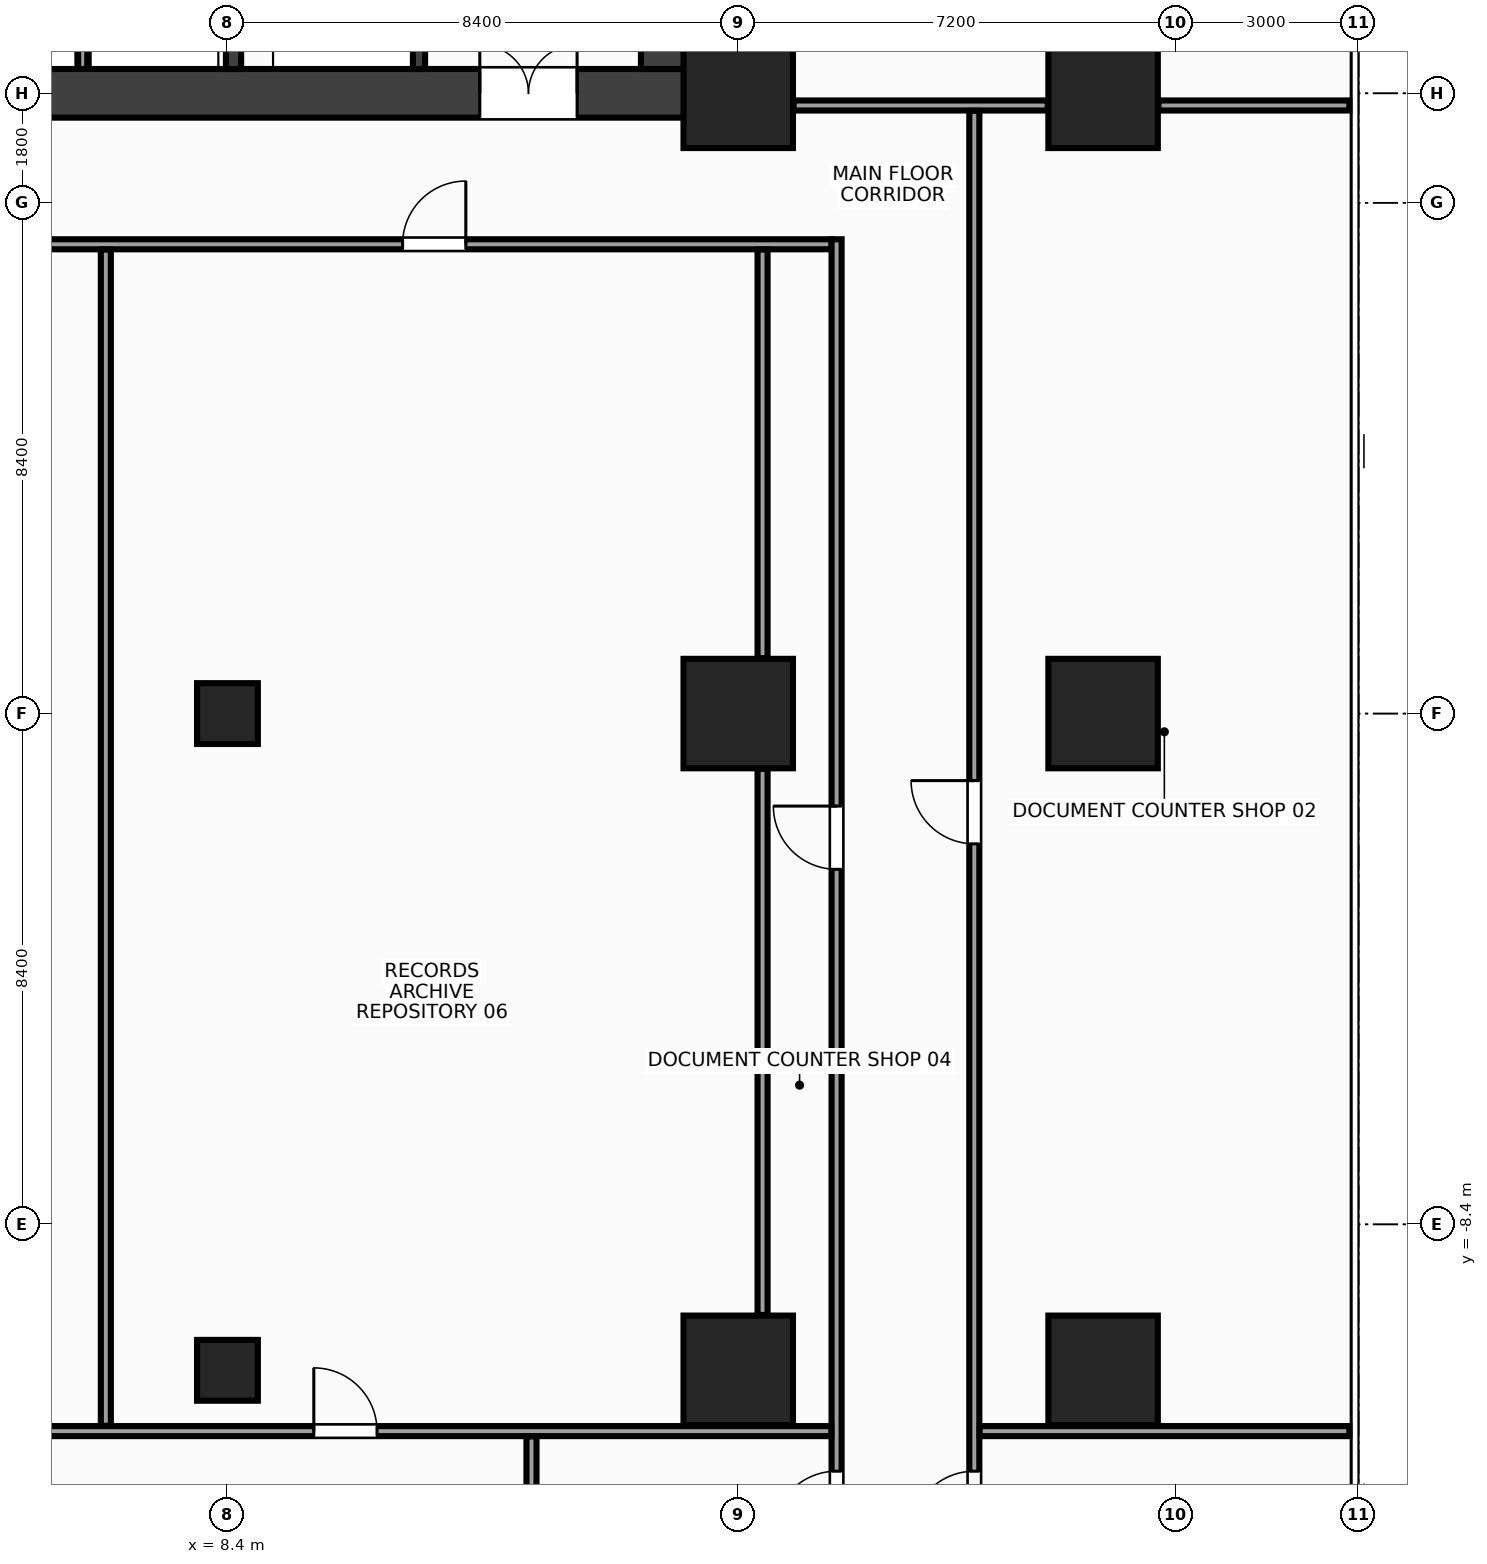
"""IFC4 building model, lengths in metres.
Left out: names, types, materials, properties, quantities, classifications, styles, units other than length and angle.
Written with IfcOpenShell. Run it as: python <this file> out.ifc"""

import sys

from ifc_helpers import new_model, si_unit, direction, frame, frame_2d, origin, origin_2d, place, context, subcontext, project, spatial, rectangle, hollow_rectangle, extrude, source, transform, mapped, element, fill, save


model = new_model("IFC4")
c1 = context("Model", 3, precision=1e-05, world=origin(), true_north=direction((0.0, 1.0)))
c2 = subcontext(c1, "Body", "Model", "MODEL_VIEW")
j1 = project(units=[si_unit("LENGTHUNIT", "METRE"), si_unit("PLANEANGLEUNIT", "RADIAN")], contexts=[c1])
p1 = place(None, origin())
s1 = spatial("IfcSite", under=j1, at=p1, CompositionType="ELEMENT")
p2 = place(p1, origin())
s2 = spatial("IfcBuilding", under=s1, at=p2, CompositionType="ELEMENT")
p3 = place(p2, frame((0.0, 0.0, 59.6)))
s3 = spatial("IfcBuildingStorey", under=s2, at=p3, CompositionType="ELEMENT", Elevation=59.6)
m1 = source(origin(), c2, "Body", "SweptSolid", [
    extrude(rectangle(XDim=32.0, YDim=0.8, at=frame_2d((16.0, 0.0))), origin(), (0.0, 0.0, 1.0), 3.6),
])
p4 = place(p3, frame((-16.0, 10.2, 0.0), z_axis=(0.0, 0.0, 1.0), x_axis=(1.0, 0.0, 0.0)))
e1 = element("IfcWall", 1, at=p4, inside=s3, PredefinedType="SHEAR", context=c2, shape_type="MappedRepresentation", body=[
    mapped(m1, transform((0.0, 0.0, 0.0), x_axis=(1.0, 0.0, 0.0), y_axis=(0.0, 1.0, 0.0), z_axis=(0.0, 0.0, 1.0), scale=1.0)),
])
p5 = place(p4, frame((1.85, 0.0, 0.0)))
e2 = element("IfcOpeningElement", 2, at=p5, cuts=e1, PredefinedType="OPENING", context=c2, shape_type="SweptSolid", body=[
    extrude(rectangle(XDim=1.6, YDim=2.15, at=frame_2d((0.8, 1.075))), frame((0.0, 0.412, 0.0), z_axis=(0.0, -1.0, 0.0), x_axis=(1.0, 0.0, 0.0)), (0.0, 0.0, 1.0), 0.824),
])
p6 = place(p4, frame((28.55, 0.0, 0.0)))
e3 = element("IfcOpeningElement", 3, at=p6, cuts=e1, PredefinedType="OPENING", context=c2, shape_type="SweptSolid", body=[
    extrude(rectangle(XDim=1.6, YDim=2.15, at=frame_2d((0.8, 1.075))), frame((0.0, 0.412, 0.0), z_axis=(0.0, -1.0, 0.0), x_axis=(1.0, 0.0, 0.0)), (0.0, 0.0, 1.0), 0.824),
])
p7 = place(p4, frame((15.25, 0.0, 0.0)))
e4 = element("IfcOpeningElement", 4, at=p7, cuts=e1, PredefinedType="OPENING", context=c2, shape_type="SweptSolid", body=[
    extrude(rectangle(XDim=1.5, YDim=2.2, at=frame_2d((0.75, 1.1))), frame((0.0, 0.412, 0.0), z_axis=(0.0, -1.0, 0.0), x_axis=(1.0, 0.0, 0.0)), (0.0, 0.0, 1.0), 0.824),
])
m2 = source(origin(), c2, "Body", "SweptSolid", [
    extrude(rectangle(XDim=12.8, YDim=0.8, at=frame_2d((6.4, 0.0))), origin(), (0.0, 0.0, 1.0), 3.6),
])
p8 = place(p3, frame((15.6, 10.6, 0.0), z_axis=(0.0, 0.0, 1.0), x_axis=(0.0, 1.0, 0.0)))
e5 = element("IfcWall", 5, at=p8, inside=s3, PredefinedType="SHEAR", context=c2, shape_type="MappedRepresentation", body=[
    mapped(m2, transform((0.0, 0.0, 0.0), x_axis=(1.0, 0.0, 0.0), y_axis=(0.0, 1.0, 0.0), z_axis=(0.0, 0.0, 1.0), scale=1.0)),
])
m3 = source(origin(), c2, "Body", "SweptSolid", [
    extrude(rectangle(XDim=12.8, YDim=0.25, at=frame_2d((6.4, 0.0))), origin(), (0.0, 0.0, 1.0), 3.6),
])
p9 = place(p3, frame((8.5, 10.6, 0.0), z_axis=(0.0, 0.0, 1.0), x_axis=(0.0, 1.0, 0.0)))
e6 = element("IfcWall", 6, at=p9, inside=s3, PredefinedType="SHEAR", context=c2, shape_type="MappedRepresentation", body=[
    mapped(m3, transform((0.0, 0.0, 0.0), x_axis=(1.0, 0.0, 0.0), y_axis=(0.0, 1.0, 0.0), z_axis=(0.0, 0.0, 1.0), scale=1.0)),
])
p10 = place(p9, frame((9.85, 0.0, 0.0)))
e7 = element("IfcOpeningElement", 7, at=p10, cuts=e6, PredefinedType="OPENING", context=c2, shape_type="SweptSolid", body=[
    extrude(rectangle(XDim=0.95, YDim=2.15, at=frame_2d((0.475, 1.075))), frame((0.0, 0.137, 0.0), z_axis=(0.0, -1.0, 0.0), x_axis=(1.0, 0.0, 0.0)), (0.0, 0.0, 1.0), 0.274),
])
m4 = source(origin(), c2, "Body", "SweptSolid", [
    extrude(rectangle(XDim=3.05, YDim=0.2, at=frame_2d((1.525, 0.0))), origin(), (0.0, 0.0, 1.0), 3.6),
])
p11 = place(p3, frame((11.55, 10.6, 0.0), z_axis=(0.0, 0.0, 1.0), x_axis=(0.0, 1.0, 0.0)))
e8 = element("IfcWall", 8, at=p11, inside=s3, PredefinedType="SHEAR", context=c2, shape_type="MappedRepresentation", body=[
    mapped(m4, transform((0.0, 0.0, 0.0), x_axis=(1.0, 0.0, 0.0), y_axis=(0.0, 1.0, 0.0), z_axis=(0.0, 0.0, 1.0), scale=1.0)),
])
p12 = place(p11, frame((0.9, 0.0, 0.0)))
e9 = element("IfcOpeningElement", 9, at=p12, cuts=e8, PredefinedType="OPENING", context=c2, shape_type="SweptSolid", body=[
    extrude(rectangle(XDim=1.1, YDim=2.15, at=frame_2d((0.55, 1.075))), frame((0.0, 0.112, 0.0), z_axis=(0.0, -1.0, 0.0), x_axis=(1.0, 0.0, 0.0)), (0.0, 0.0, 1.0), 0.224),
])
m5 = source(origin(), c2, "Body", "SweptSolid", [
    extrude(rectangle(XDim=1.8, YDim=1.8, at=origin_2d()), origin(), (0.0, 0.0, 1.0), 3.6),
])
for number, where, z_axis, x_axis in (
    (10, (16.8, -10.8, 0.0), (0.0, 0.0, 1.0), (1.0, 0.0, 0.0)),
    (11, (16.8, 0.0, 0.0), (0.0, 0.0, 1.0), (1.0, 0.0, 0.0)),
    (12, (16.8, 10.2, 0.0), (0.0, 0.0, 1.0), (1.0, 0.0, 0.0)),
    (13, (22.8, -10.8, 0.0), (0.0, 0.0, 1.0), (1.0, 0.0, 0.0)),
    (14, (22.8, 0.0, 0.0), (0.0, 0.0, 1.0), (1.0, 0.0, 0.0)),
    (15, (22.8, 10.2, 0.0), (0.0, 0.0, 1.0), (1.0, 0.0, 0.0)),
):
    element("IfcColumn", number, at=place(p3, frame(where, z_axis=z_axis, x_axis=x_axis)), inside=s3, PredefinedType="COLUMN", context=c2, shape_type="MappedRepresentation", body=[
        mapped(m5, transform((0.0, 0.0, 0.0), x_axis=(1.0, 0.0, 0.0), y_axis=(0.0, 1.0, 0.0), z_axis=(0.0, 0.0, 1.0), scale=1.0)),
    ])
m6 = source(origin(), c2, "Body", "SweptSolid", [
    extrude(hollow_rectangle(XDim=1.0, YDim=1.0, WallThickness=0.045, at=origin_2d()), origin(), (0.0, 0.0, 1.0), 3.6),
])
for number, where, z_axis, x_axis in (
    (16, (8.4, 0.0, 0.0), (0.0, 0.0, 1.0), (1.0, 0.0, 0.0)),
    (17, (8.4, -10.8, 0.0), (0.0, 0.0, 1.0), (1.0, 0.0, 0.0)),
):
    element("IfcColumn", number, at=place(p3, frame(where, z_axis=z_axis, x_axis=x_axis)), inside=s3, PredefinedType="COLUMN", context=c2, shape_type="MappedRepresentation", body=[
        mapped(m6, transform((0.0, 0.0, 0.0), x_axis=(1.0, 0.0, 0.0), y_axis=(0.0, 1.0, 0.0), z_axis=(0.0, 0.0, 1.0), scale=1.0)),
    ])
m7 = source(origin(), c2, "Body", "SweptSolid", [
    extrude(rectangle(XDim=3.34, YDim=0.15, at=frame_2d((1.67, 0.0))), origin(), (0.0, 0.0, 1.0), 3.36),
])
p13 = place(p3, frame((6.02, 10.6, 0.0), z_axis=(0.0, 0.0, 1.0), x_axis=(0.0, 1.0, 0.0)))
e18 = element("IfcWall", 18, at=p13, inside=s3, PredefinedType="PARTITIONING", context=c2, shape_type="MappedRepresentation", body=[
    mapped(m7, transform((0.0, 0.0, 0.0), x_axis=(1.0, 0.0, 0.0), y_axis=(0.0, 1.0, 0.0), z_axis=(0.0, 0.0, 1.0), scale=1.0)),
])
m8 = source(origin(), c2, "Body", "SweptSolid", [
    extrude(rectangle(XDim=4.18, YDim=0.165, at=frame_2d((2.09, 0.0))), origin(), (0.0, 0.0, 1.0), 2.745),
])
p14 = place(p3, frame((17.71, 10.0, 0.0), z_axis=(0.0, 0.0, 1.0), x_axis=(1.0, 0.0, 0.0)))
e19 = element("IfcWall", 19, at=p14, inside=s3, PredefinedType="PARTITIONING", context=c2, shape_type="MappedRepresentation", body=[
    mapped(m8, transform((0.0, 0.0, 0.0), x_axis=(1.0, 0.0, 0.0), y_axis=(0.0, 1.0, 0.0), z_axis=(0.0, 0.0, 1.0), scale=1.0)),
])
m9 = source(origin(), c2, "Body", "SweptSolid", [
    extrude(rectangle(XDim=3.14, YDim=0.165, at=frame_2d((1.57, 0.0))), origin(), (0.0, 0.0, 1.0), 2.435),
])
p15 = place(p3, frame((23.71, 10.0, 0.0), z_axis=(0.0, 0.0, 1.0), x_axis=(1.0, 0.0, 0.0)))
e20 = element("IfcWall", 20, at=p15, inside=s3, PredefinedType="PARTITIONING", context=c2, shape_type="MappedRepresentation", body=[
    mapped(m9, transform((0.0, 0.0, 0.0), x_axis=(1.0, 0.0, 0.0), y_axis=(0.0, 1.0, 0.0), z_axis=(0.0, 0.0, 1.0), scale=1.0)),
])
m10 = source(origin(), c2, "Body", "SweptSolid", [
    extrude(rectangle(XDim=36.67, YDim=0.165, at=frame_2d((18.335, 0.0))), origin(), (0.0, 0.0, 1.0), 2.745),
])
p16 = place(p3, frame((-18.335, 7.718, 0.0), z_axis=(0.0, 0.0, 1.0), x_axis=(1.0, 0.0, 0.0)))
e21 = element("IfcWall", 21, at=p16, inside=s3, PredefinedType="PARTITIONING", context=c2, shape_type="MappedRepresentation", body=[
    mapped(m10, transform((0.0, 0.0, 0.0), x_axis=(1.0, 0.0, 0.0), y_axis=(0.0, 1.0, 0.0), z_axis=(0.0, 0.0, 1.0), scale=1.0)),
])
p17 = place(p16, frame((6.015, 0.0, 0.0)))
e22 = element("IfcOpeningElement", 22, at=p17, cuts=e21, PredefinedType="OPENING", context=c2, shape_type="SweptSolid", body=[
    extrude(rectangle(XDim=1.04, YDim=2.2, at=frame_2d((0.52, 1.1))), frame((0.0, 0.094, 0.0), z_axis=(0.0, -1.0, 0.0), x_axis=(1.0, 0.0, 0.0)), (0.0, 0.0, 1.0), 0.189),
])
p18 = place(p16, frame((29.615, 0.0, 0.0)))
e23 = element("IfcOpeningElement", 23, at=p18, cuts=e21, PredefinedType="OPENING", context=c2, shape_type="SweptSolid", body=[
    extrude(rectangle(XDim=1.04, YDim=2.2, at=frame_2d((0.52, 1.1))), frame((0.0, 0.094, 0.0), z_axis=(0.0, -1.0, 0.0), x_axis=(1.0, 0.0, 0.0)), (0.0, 0.0, 1.0), 0.189),
])
p19 = place(p16, frame((17.815, 0.0, 0.0)))
e24 = element("IfcOpeningElement", 24, at=p19, cuts=e21, PredefinedType="OPENING", context=c2, shape_type="SweptSolid", body=[
    extrude(rectangle(XDim=1.04, YDim=2.2, at=frame_2d((0.52, 1.1))), frame((0.0, 0.094, 0.0), z_axis=(0.0, -1.0, 0.0), x_axis=(1.0, 0.0, 0.0)), (0.0, 0.0, 1.0), 0.189),
])
m11 = source(origin(), c2, "Body", "SweptSolid", [
    extrude(rectangle(XDim=21.995, YDim=0.165, at=frame_2d((10.998, 0.0))), origin(), (0.0, 0.0, 1.0), 2.745),
])
p20 = place(p3, frame((18.417, -14.195, 0.0), z_axis=(0.0, 0.0, 1.0), x_axis=(0.0, 1.0, 0.0)))
e25 = element("IfcWall", 25, at=p20, inside=s3, PredefinedType="PARTITIONING", context=c2, shape_type="MappedRepresentation", body=[
    mapped(m11, transform((0.0, 0.0, 0.0), x_axis=(1.0, 0.0, 0.0), y_axis=(0.0, 1.0, 0.0), z_axis=(0.0, 0.0, 1.0), scale=1.0)),
])
p21 = place(p20, frame((11.634, 0.0, 0.0)))
e26 = element("IfcOpeningElement", 26, at=p21, cuts=e25, PredefinedType="OPENING", context=c2, shape_type="SweptSolid", body=[
    extrude(rectangle(XDim=1.04, YDim=2.2, at=frame_2d((0.52, 1.1))), frame((0.0, 0.094, 0.0), z_axis=(0.0, -1.0, 0.0), x_axis=(1.0, 0.0, 0.0)), (0.0, 0.0, 1.0), 0.189),
])
p22 = place(p20, frame((0.696, 0.0, 0.0)))
e27 = element("IfcOpeningElement", 27, at=p22, cuts=e25, PredefinedType="OPENING", context=c2, shape_type="SweptSolid", body=[
    extrude(rectangle(XDim=1.04, YDim=2.2, at=frame_2d((0.52, 1.1))), frame((0.0, 0.094, 0.0), z_axis=(0.0, -1.0, 0.0), x_axis=(1.0, 0.0, 0.0)), (0.0, 0.0, 1.0), 0.189),
])
m12 = source(origin(), c2, "Body", "SweptSolid", [
    extrude(rectangle(XDim=24.108, YDim=0.165, at=frame_2d((12.054, 0.0))), origin(), (0.0, 0.0, 1.0), 2.745),
])
p23 = place(p3, frame((20.683, -14.195, 0.0), z_axis=(0.0, 0.0, 1.0), x_axis=(0.0, 1.0, 0.0)))
e28 = element("IfcWall", 28, at=p23, inside=s3, PredefinedType="PARTITIONING", context=c2, shape_type="MappedRepresentation", body=[
    mapped(m12, transform((0.0, 0.0, 0.0), x_axis=(1.0, 0.0, 0.0), y_axis=(0.0, 1.0, 0.0), z_axis=(0.0, 0.0, 1.0), scale=1.0)),
])
p24 = place(p23, frame((12.052, 0.0, 0.0)))
e29 = element("IfcOpeningElement", 29, at=p24, cuts=e28, PredefinedType="OPENING", context=c2, shape_type="SweptSolid", body=[
    extrude(rectangle(XDim=1.04, YDim=2.2, at=frame_2d((0.52, 1.1))), frame((0.0, 0.094, 0.0), z_axis=(0.0, -1.0, 0.0), x_axis=(1.0, 0.0, 0.0)), (0.0, 0.0, 1.0), 0.189),
])
p25 = place(p23, frame((0.696, 0.0, 0.0)))
e30 = element("IfcOpeningElement", 30, at=p25, cuts=e28, PredefinedType="OPENING", context=c2, shape_type="SweptSolid", body=[
    extrude(rectangle(XDim=1.04, YDim=2.2, at=frame_2d((0.52, 1.1))), frame((0.0, 0.094, 0.0), z_axis=(0.0, -1.0, 0.0), x_axis=(1.0, 0.0, 0.0)), (0.0, 0.0, 1.0), 0.189),
])
m13 = source(origin(), c2, "Body", "SweptSolid", [
    extrude(rectangle(XDim=36.66, YDim=0.165, at=frame_2d((18.33, 0.0))), origin(), (0.0, 0.0, 1.0), 2.945),
])
p26 = place(p3, frame((-18.33, -11.8, 0.0), z_axis=(0.0, 0.0, 1.0), x_axis=(1.0, 0.0, 0.0)))
e31 = element("IfcWall", 31, at=p26, inside=s3, PredefinedType="PARTITIONING", context=c2, shape_type="MappedRepresentation", body=[
    mapped(m13, transform((0.0, 0.0, 0.0), x_axis=(1.0, 0.0, 0.0), y_axis=(0.0, 1.0, 0.0), z_axis=(0.0, 0.0, 1.0), scale=1.0)),
])
p27 = place(p26, frame((7.47, 0.0, 0.0)))
e32 = element("IfcOpeningElement", 32, at=p27, cuts=e31, PredefinedType="OPENING", context=c2, shape_type="SweptSolid", body=[
    extrude(rectangle(XDim=1.04, YDim=2.2, at=frame_2d((0.52, 1.1))), frame((0.0, 0.094, 0.0), z_axis=(0.0, -1.0, 0.0), x_axis=(1.0, 0.0, 0.0)), (0.0, 0.0, 1.0), 0.189),
])
p28 = place(p26, frame((15.83, 0.0, 0.0)))
e33 = element("IfcOpeningElement", 33, at=p28, cuts=e31, PredefinedType="OPENING", context=c2, shape_type="SweptSolid", body=[
    extrude(rectangle(XDim=1.04, YDim=2.2, at=frame_2d((0.52, 1.1))), frame((0.0, 0.094, 0.0), z_axis=(0.0, -1.0, 0.0), x_axis=(1.0, 0.0, 0.0)), (0.0, 0.0, 1.0), 0.189),
])
p29 = place(p26, frame((28.15, 0.0, 0.0)))
e34 = element("IfcOpeningElement", 34, at=p29, cuts=e31, PredefinedType="OPENING", context=c2, shape_type="SweptSolid", body=[
    extrude(rectangle(XDim=1.04, YDim=2.2, at=frame_2d((0.52, 1.1))), frame((0.0, 0.094, 0.0), z_axis=(0.0, -1.0, 0.0), x_axis=(1.0, 0.0, 0.0)), (0.0, 0.0, 1.0), 0.189),
])
m14 = source(origin(), c2, "Body", "SweptSolid", [
    extrude(rectangle(XDim=6.08, YDim=0.165, at=frame_2d((3.04, 0.0))), origin(), (0.0, 0.0, 1.0), 2.945),
])
p30 = place(p3, frame((20.77, -11.8, 0.0), z_axis=(0.0, 0.0, 1.0), x_axis=(1.0, 0.0, 0.0)))
e35 = element("IfcWall", 35, at=p30, inside=s3, PredefinedType="PARTITIONING", context=c2, shape_type="MappedRepresentation", body=[
    mapped(m14, transform((0.0, 0.0, 0.0), x_axis=(1.0, 0.0, 0.0), y_axis=(0.0, 1.0, 0.0), z_axis=(0.0, 0.0, 1.0), scale=1.0)),
])
m15 = source(origin(), c2, "Body", "SweptSolid", [
    extrude(rectangle(XDim=19.342, YDim=0.165, at=frame_2d((9.671, 0.0))), origin(), (0.0, 0.0, 1.0), 2.645),
])
p31 = place(p3, frame((6.4, -11.712, 0.0), z_axis=(0.0, 0.0, 1.0), x_axis=(0.0, 1.0, 0.0)))
e36 = element("IfcWall", 36, at=p31, inside=s3, PredefinedType="PARTITIONING", context=c2, shape_type="MappedRepresentation", body=[
    mapped(m15, transform((0.0, 0.0, 0.0), x_axis=(1.0, 0.0, 0.0), y_axis=(0.0, 1.0, 0.0), z_axis=(0.0, 0.0, 1.0), scale=1.0)),
])
m16 = source(origin(), c2, "Body", "SweptSolid", [
    extrude(rectangle(XDim=8.98, YDim=0.165, at=frame_2d((4.49, 0.0))), origin(), (0.0, 0.0, 1.0), 3.36),
])
p32 = place(p3, frame((17.2, -9.89, 0.0), z_axis=(0.0, 0.0, 1.0), x_axis=(0.0, 1.0, 0.0)))
e37 = element("IfcWall", 37, at=p32, inside=s3, PredefinedType="PARTITIONING", context=c2, shape_type="MappedRepresentation", body=[
    mapped(m16, transform((0.0, 0.0, 0.0), x_axis=(1.0, 0.0, 0.0), y_axis=(0.0, 1.0, 0.0), z_axis=(0.0, 0.0, 1.0), scale=1.0)),
])
m17 = source(origin(), c2, "Body", "SweptSolid", [
    extrude(rectangle(XDim=6.72, YDim=0.165, at=frame_2d((3.36, 0.0))), origin(), (0.0, 0.0, 1.0), 3.36),
])
p33 = place(p3, frame((17.2, 0.91, 0.0), z_axis=(0.0, 0.0, 1.0), x_axis=(0.0, 1.0, 0.0)))
e38 = element("IfcWall", 38, at=p33, inside=s3, PredefinedType="PARTITIONING", context=c2, shape_type="MappedRepresentation", body=[
    mapped(m17, transform((0.0, 0.0, 0.0), x_axis=(1.0, 0.0, 0.0), y_axis=(0.0, 1.0, 0.0), z_axis=(0.0, 0.0, 1.0), scale=1.0)),
])
m18 = source(origin(), c2, "Body", "SweptSolid", [
    extrude(rectangle(XDim=14.963, YDim=0.165, at=frame_2d((7.481, 0.0))), origin(), (0.0, 0.0, 1.0), 2.745),
])
p34 = place(p3, frame((13.4, -26.85, 0.0), z_axis=(0.0, 0.0, 1.0), x_axis=(0.0, 1.0, 0.0)))
e39 = element("IfcWall", 39, at=p34, inside=s3, PredefinedType="PARTITIONING", context=c2, shape_type="MappedRepresentation", body=[
    mapped(m18, transform((0.0, 0.0, 0.0), x_axis=(1.0, 0.0, 0.0), y_axis=(0.0, 1.0, 0.0), z_axis=(0.0, 0.0, 1.0), scale=1.0)),
])
m19 = source(origin(), c2, "Body", "SweptSolid", [
    extrude(rectangle(XDim=1.6, YDim=2.15, at=frame_2d((0.8, 1.075))), frame((0.0, 0.025, 0.0), z_axis=(0.0, -1.0, 0.0), x_axis=(1.0, 0.0, 0.0)), (0.0, 0.0, 1.0), 0.05),
])
p35 = place(p6, origin())
e40 = element("IfcDoor", 40, at=p35, inside=s3, OperationType="DOUBLE_DOOR_SINGLE_SWING", PredefinedType="DOOR", context=c2, shape_type="MappedRepresentation", body=[
    mapped(m19, transform((0.0, 0.0, 0.0), x_axis=(1.0, 0.0, 0.0), y_axis=(0.0, 1.0, 0.0), z_axis=(0.0, 0.0, 1.0), scale=1.0)),
])
fill(e3, e40)
m20 = source(origin(), c2, "Body", "SweptSolid", [
    extrude(rectangle(XDim=1.04, YDim=2.2, at=frame_2d((0.52, 1.1))), frame((0.0, 0.025, 0.0), z_axis=(0.0, -1.0, 0.0), x_axis=(1.0, 0.0, 0.0)), (0.0, 0.0, 1.0), 0.05),
])
p36 = place(p24, origin())
e41 = element("IfcDoor", 41, at=p36, inside=s3, OperationType="SINGLE_SWING_RIGHT", PredefinedType="DOOR", context=c2, shape_type="MappedRepresentation", body=[
    mapped(m20, transform((0.0, 0.0, 0.0), x_axis=(1.0, 0.0, 0.0), y_axis=(0.0, 1.0, 0.0), z_axis=(0.0, 0.0, 1.0), scale=1.0)),
])
fill(e29, e41)
p37 = place(p21, origin())
e42 = element("IfcDoor", 42, at=p37, inside=s3, OperationType="SINGLE_SWING_RIGHT", PredefinedType="DOOR", context=c2, shape_type="MappedRepresentation", body=[
    mapped(m20, transform((0.0, 0.0, 0.0), x_axis=(1.0, 0.0, 0.0), y_axis=(0.0, 1.0, 0.0), z_axis=(0.0, 0.0, 1.0), scale=1.0)),
])
fill(e26, e42)
p38 = place(p18, origin())
e43 = element("IfcDoor", 43, at=p38, inside=s3, OperationType="SINGLE_SWING_RIGHT", PredefinedType="DOOR", context=c2, shape_type="MappedRepresentation", body=[
    mapped(m20, transform((0.0, 0.0, 0.0), x_axis=(1.0, 0.0, 0.0), y_axis=(0.0, 1.0, 0.0), z_axis=(0.0, 0.0, 1.0), scale=1.0)),
])
fill(e23, e43)
p39 = place(p25, origin())
e44 = element("IfcDoor", 44, at=p39, inside=s3, OperationType="SINGLE_SWING_LEFT", PredefinedType="DOOR", context=c2, shape_type="MappedRepresentation", body=[
    mapped(m20, transform((0.0, 0.0, 0.0), x_axis=(1.0, 0.0, 0.0), y_axis=(0.0, 1.0, 0.0), z_axis=(0.0, 0.0, 1.0), scale=1.0)),
])
fill(e30, e44)
p40 = place(p22, origin())
e45 = element("IfcDoor", 45, at=p40, inside=s3, OperationType="SINGLE_SWING_LEFT", PredefinedType="DOOR", context=c2, shape_type="MappedRepresentation", body=[
    mapped(m20, transform((0.0, 0.0, 0.0), x_axis=(1.0, 0.0, 0.0), y_axis=(0.0, 1.0, 0.0), z_axis=(0.0, 0.0, 1.0), scale=1.0)),
])
fill(e27, e45)
p41 = place(p29, origin())
e46 = element("IfcDoor", 46, at=p41, inside=s3, OperationType="SINGLE_SWING_LEFT", PredefinedType="DOOR", context=c2, shape_type="MappedRepresentation", body=[
    mapped(m20, transform((0.0, 0.0, 0.0), x_axis=(1.0, 0.0, 0.0), y_axis=(0.0, 1.0, 0.0), z_axis=(0.0, 0.0, 1.0), scale=1.0)),
])
fill(e34, e46)
save(model, sys.argv[1])
